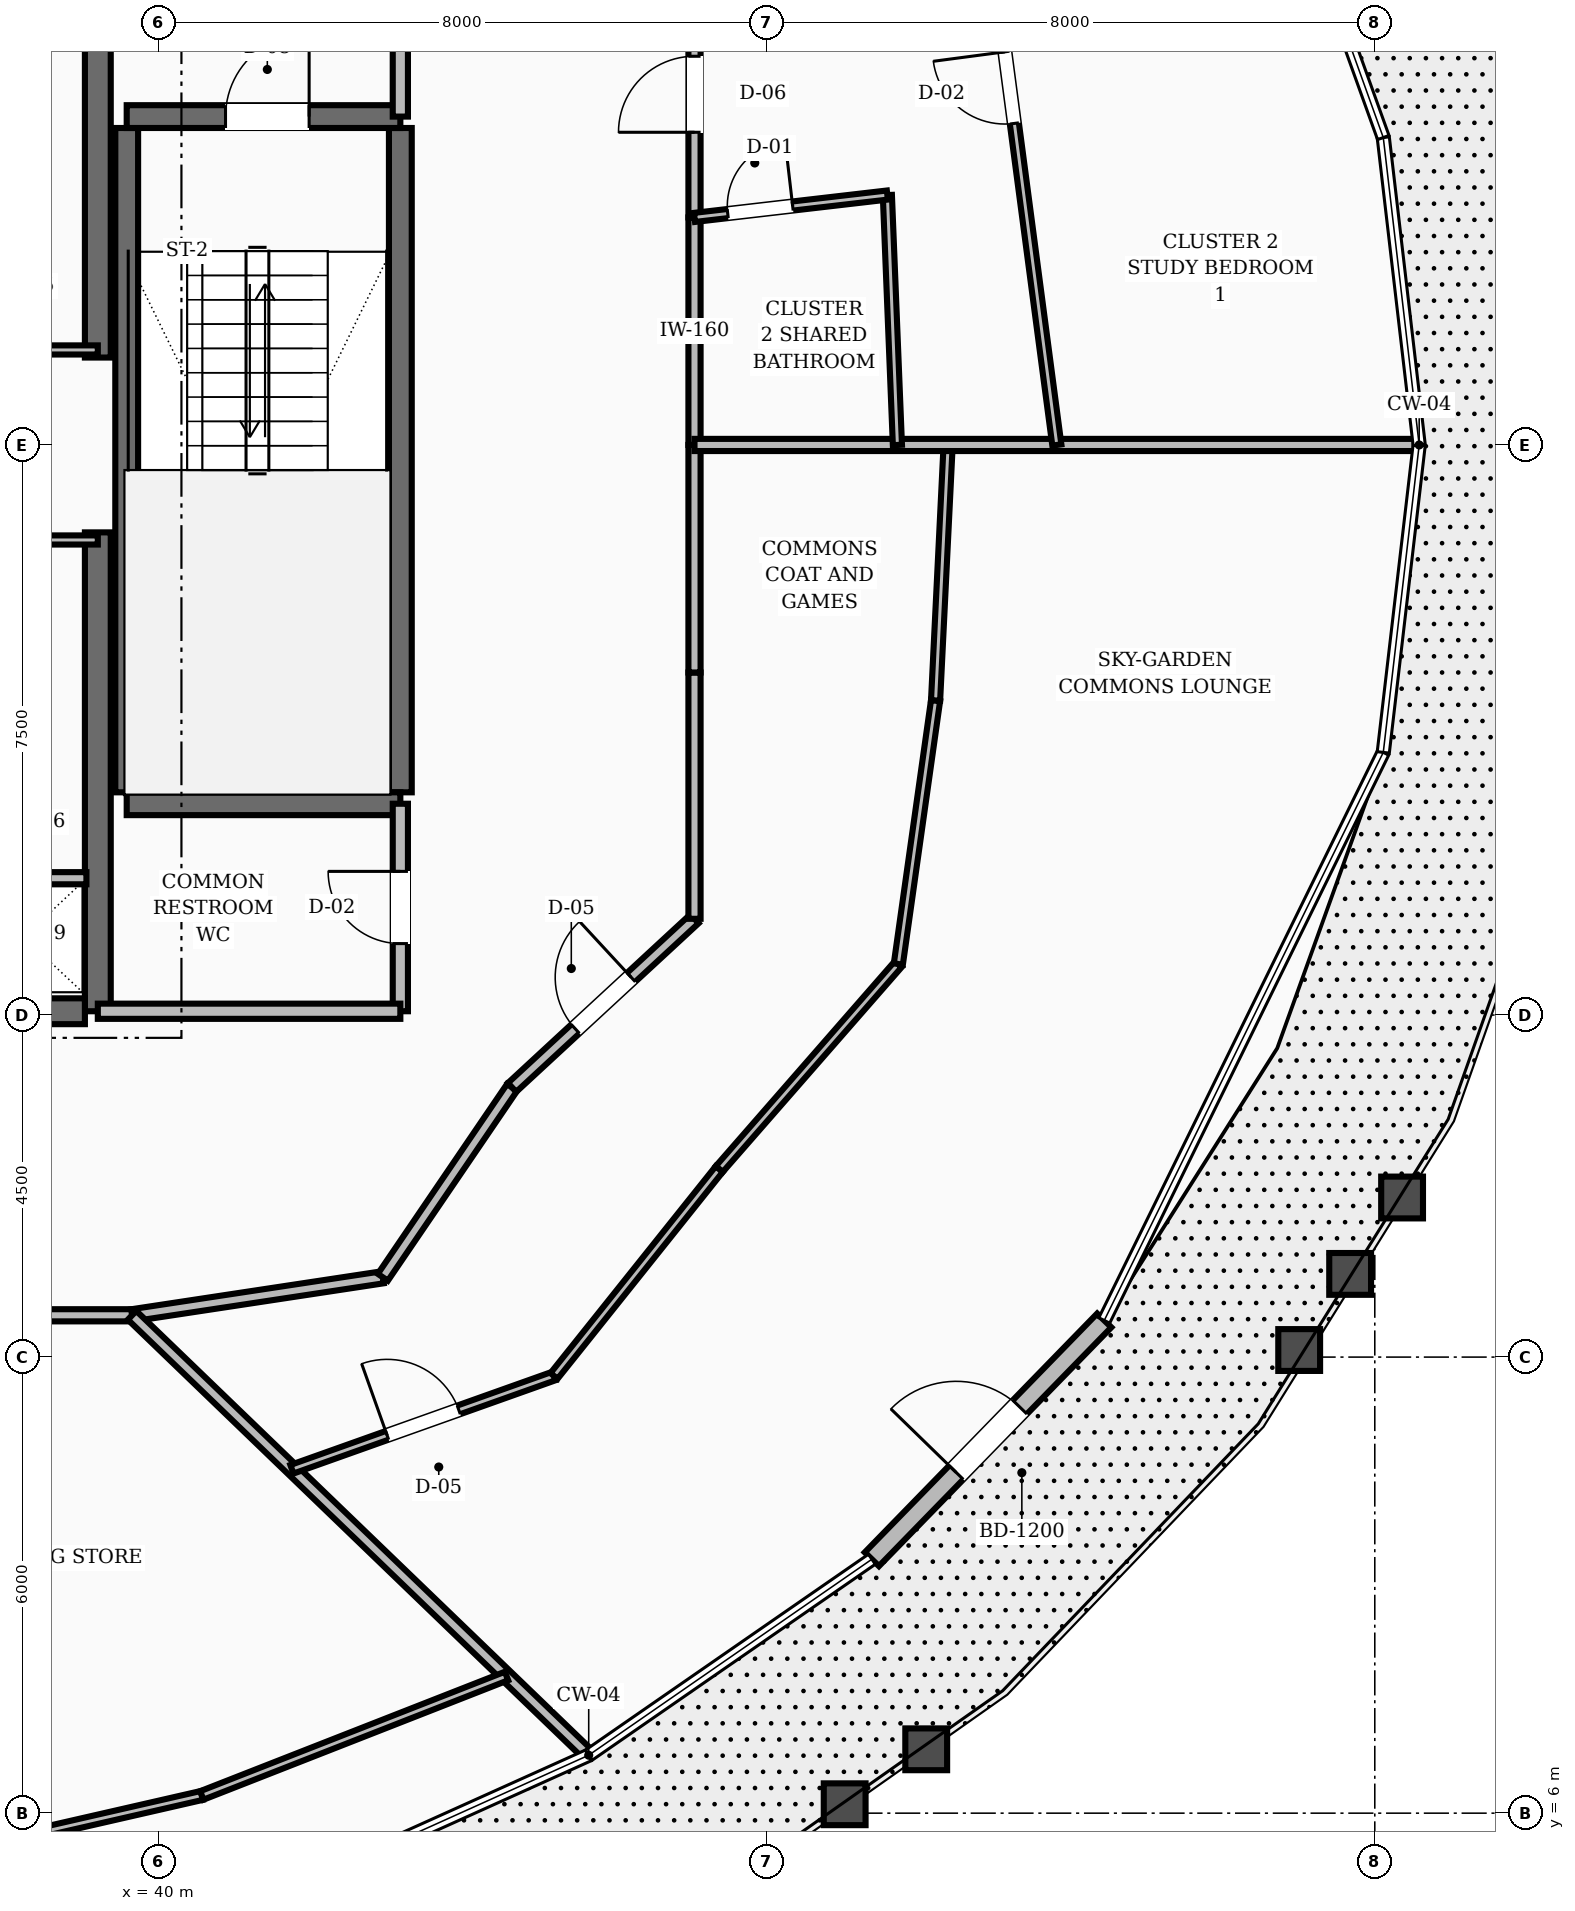
"""IFC4 building model, lengths in metres.
Left out: names, types, materials, properties, quantities, classifications, styles, units other than length and angle.
Written with IfcOpenShell. Run it as: python <this file> out.ifc"""

import sys

from ifc_helpers import new_model, si_unit, direction, frame, frame_2d, origin, place, context, subcontext, project, spatial, rectangle, extrude, element, fill, save


model = new_model("IFC4")
c1 = context("Model", 3, precision=1e-05, world=origin(), true_north=direction((0.0, 1.0)))
c2 = subcontext(c1, "Body", "Model", "MODEL_VIEW")
j1 = project(units=[si_unit("LENGTHUNIT", "METRE"), si_unit("PLANEANGLEUNIT", "RADIAN")], contexts=[c1])
p1 = place(None, origin())
s1 = spatial("IfcSite", under=j1, at=p1, CompositionType="ELEMENT")
p2 = place(p1, origin())
s2 = spatial("IfcBuilding", under=s1, at=p2, CompositionType="ELEMENT")
p3 = place(p2, frame((0.0, 0.0, 189.2)))
s3 = spatial("IfcBuildingStorey", under=s2, at=p3, CompositionType="ELEMENT", Elevation=189.2)
for number, where, z_axis, x_axis in (
    (1, (39.2, 16.55, 0.0), (0.0, 0.0, 1.0), (0.0, 1.0, 0.0)),
    (2, (39.2, 25.15, 0.0), (0.0, 0.0, 1.0), (0.0, 1.0, 0.0)),
):
    element("IfcWall", number, at=place(p3, frame(where, z_axis=z_axis, x_axis=x_axis)), inside=s3, PredefinedType="SHEAR", context=c2, shape_type="SweptSolid", body=[
        extrude(rectangle(XDim=6.3, YDim=0.34, at=frame_2d((3.15, 0.0))), origin(), (0.0, 0.0, 1.0), 3.6),
    ])
p4 = place(p3, frame((35.8, 16.55, 0.0), z_axis=(0.0, 0.0, 1.0), x_axis=(1.0, 0.0, 0.0)))
e3 = element("IfcWall", 3, at=p4, inside=s3, PredefinedType="SHEAR", context=c2, shape_type="SweptSolid", body=[
    extrude(rectangle(XDim=3.23, YDim=0.34, at=frame_2d((1.615, 0.0))), origin(), (0.0, 0.0, 1.0), 3.6),
])
p5 = place(p4, frame((0.3, 0.0, 0.0)))
e4 = element("IfcOpeningElement", 4, at=p5, cuts=e3, PredefinedType="OPENING", context=c2, shape_type="SweptSolid", body=[
    extrude(rectangle(XDim=1.1, YDim=2.1, at=frame_2d((0.55, 1.05))), frame((0.0, 0.18, 0.0), z_axis=(0.0, -1.0, 0.0), x_axis=(1.0, 0.0, 0.0)), (0.0, 0.0, 1.0), 0.36),
])
for number, where, z_axis, x_axis in (
    (5, (43.18, 19.43, 0.0), (0.0, 0.0, 1.0), (0.0, 1.0, 0.0)),
    (6, (39.58, 19.43, 0.0), (0.0, 0.0, 1.0), (0.0, 1.0, 0.0)),
):
    element("IfcWall", number, at=place(p3, frame(where, z_axis=z_axis, x_axis=x_axis)), inside=s3, PredefinedType="SHEAR", context=c2, shape_type="SweptSolid", body=[
        extrude(rectangle(XDim=8.74, YDim=0.3, at=frame_2d((4.37, 0.0))), origin(), (0.0, 0.0, 1.0), 3.6),
    ])
p6 = place(p3, frame((39.58, 19.28, 0.0), z_axis=(0.0, 0.0, 1.0), x_axis=(1.0, 0.0, 0.0)))
e7 = element("IfcWall", 7, at=p6, inside=s3, PredefinedType="SHEAR", context=c2, shape_type="SweptSolid", body=[
    extrude(rectangle(XDim=3.6, YDim=0.3, at=frame_2d((1.8, 0.0))), origin(), (0.0, 0.0, 1.0), 3.6),
])
p7 = place(p3, frame((39.58, 28.32, 0.0), z_axis=(0.0, 0.0, 1.0), x_axis=(1.0, 0.0, 0.0)))
e8 = element("IfcWall", 8, at=p7, inside=s3, PredefinedType="SHEAR", context=c2, shape_type="SweptSolid", body=[
    extrude(rectangle(XDim=3.6, YDim=0.3, at=frame_2d((1.8, 0.0))), origin(), (0.0, 0.0, 1.0), 3.6),
])
p8 = place(p7, frame((1.3, 0.0, 0.0)))
e9 = element("IfcOpeningElement", 9, at=p8, cuts=e8, PredefinedType="OPENING", context=c2, shape_type="SweptSolid", body=[
    extrude(rectangle(XDim=1.1, YDim=2.1, at=frame_2d((0.55, 1.05))), frame((0.0, 0.16, 0.0), z_axis=(0.0, -1.0, 0.0), x_axis=(1.0, 0.0, 0.0)), (0.0, 0.0, 1.0), 0.32),
])
p9 = place(p3, frame((49.384, 9.341, 0.0), z_axis=(0.0, 0.0, 1.0), x_axis=(0.697434596523, 0.716648437919, 0.0)))
e10 = element("IfcWall", 10, at=p9, inside=s3, PredefinedType="STANDARD", context=c2, shape_type="SweptSolid", body=[
    extrude(rectangle(XDim=4.384, YDim=0.26, at=frame_2d((2.192, 0.0))), origin(), (0.0, 0.0, 1.0), 2.82),
])
p10 = place(p9, frame((1.592, 0.0, 0.0)))
e11 = element("IfcOpeningElement", 11, at=p10, cuts=e10, PredefinedType="OPENING", context=c2, shape_type="SweptSolid", body=[
    extrude(rectangle(XDim=1.2, YDim=2.15, at=frame_2d((0.6, 1.075))), frame((0.0, 0.14, 0.0), z_axis=(0.0, -1.0, 0.0), x_axis=(1.0, 0.0, 0.0)), (0.0, 0.0, 1.0), 0.28),
])
p11 = place(p3, frame((43.18, 28.32, 0.0), z_axis=(0.0, 0.0, 1.0), x_axis=(0.0, 1.0, 0.0)))
e12 = element("IfcWall", 12, at=p11, inside=s3, PredefinedType="SOLIDWALL", context=c2, shape_type="SweptSolid", body=[
    extrude(rectangle(XDim=3.13, YDim=0.2, at=frame_2d((1.565, 0.0))), origin(), (0.0, 0.0, 1.0), 2.8),
])
p12 = place(p11, frame((1.015, 0.0, 0.0)))
e13 = element("IfcOpeningElement", 13, at=p12, cuts=e12, PredefinedType="OPENING", context=c2, shape_type="SweptSolid", body=[
    extrude(rectangle(XDim=1.1, YDim=2.1, at=frame_2d((0.55, 1.05))), frame((0.0, 0.11, 0.0), z_axis=(0.0, -1.0, 0.0), x_axis=(1.0, 0.0, 0.0)), (0.0, 0.0, 1.0), 0.22),
])
p13 = place(p3, frame((43.18, 16.55, 0.0), z_axis=(0.0, 0.0, 1.0), x_axis=(0.0, 1.0, 0.0)))
e14 = element("IfcWall", 14, at=p13, inside=s3, PredefinedType="SOLIDWALL", context=c2, shape_type="SweptSolid", body=[
    extrude(rectangle(XDim=2.73, YDim=0.2, at=frame_2d((1.365, 0.0))), origin(), (0.0, 0.0, 1.0), 2.8),
])
p14 = place(p13, frame((0.89, 0.0, 0.0)))
e15 = element("IfcOpeningElement", 15, at=p14, cuts=e14, PredefinedType="OPENING", context=c2, shape_type="SweptSolid", body=[
    extrude(rectangle(XDim=0.95, YDim=2.1, at=frame_2d((0.475, 1.05))), frame((0.0, 0.11, 0.0), z_axis=(0.0, -1.0, 0.0), x_axis=(1.0, 0.0, 0.0)), (0.0, 0.0, 1.0), 0.22),
])
p15 = place(p3, frame((39.2, 16.55, 0.0), z_axis=(0.0, 0.0, 1.0), x_axis=(1.0, 0.0, 0.0)))
e16 = element("IfcWall", 16, at=p15, inside=s3, PredefinedType="SOLIDWALL", context=c2, shape_type="SweptSolid", body=[
    extrude(rectangle(XDim=3.98, YDim=0.2, at=frame_2d((1.99, 0.0))), origin(), (0.0, 0.0, 1.0), 2.8),
])
p16 = place(p3, frame((37.4, 18.3, 0.0), z_axis=(0.0, 0.0, 1.0), x_axis=(1.0, 0.0, 0.0)))
e17 = element("IfcWall", 17, at=p16, inside=s3, PredefinedType="SOLIDWALL", context=c2, shape_type="SweptSolid", body=[
    extrude(rectangle(XDim=1.65, YDim=0.16, at=frame_2d((0.825, 0.0))), origin(), (0.0, 0.0, 1.0), 2.8),
])
for number, where, z_axis, x_axis in (
    (18, (37.4, 25.25, 0.0), (0.0, 0.0, 1.0), (1.0, 0.0, 0.0)),
    (19, (37.4, 22.75, 0.0), (0.0, 0.0, 1.0), (1.0, 0.0, 0.0)),
):
    element("IfcWall", number, at=place(p3, frame(where, z_axis=z_axis, x_axis=x_axis)), inside=s3, PredefinedType="PARTITIONING", context=c2, shape_type="SweptSolid", body=[
        extrude(rectangle(XDim=1.8, YDim=0.12, at=frame_2d((0.9, 0.0))), origin(), (0.0, 0.0, 1.0), 2.8),
    ])
p17 = place(p3, frame((47.05, 24.0, 0.0), z_axis=(0.0, 0.0, 1.0), x_axis=(0.0, 1.0, 0.0)))
e20 = element("IfcWall", 20, at=p17, inside=s3, PredefinedType="SOLIDWALL", context=c2, shape_type="SweptSolid", body=[
    extrude(rectangle(XDim=2.994, YDim=0.16, at=frame_2d((1.497, 0.0))), origin(), (0.0, 0.0, 1.0), 2.8),
])
p18 = place(p3, frame((47.05, 26.994, 0.0), z_axis=(0.0, 0.0, 1.0), x_axis=(0.0, 1.0, 0.0)))
e21 = element("IfcWall", 21, at=p18, inside=s3, PredefinedType="SOLIDWALL", context=c2, shape_type="SweptSolid", body=[
    extrude(rectangle(XDim=3.24, YDim=0.16, at=frame_2d((1.62, 0.0))), origin(), (0.0, 0.0, 1.0), 2.8),
])
p19 = place(p18, frame((1.12, 0.0, 0.0)))
e22 = element("IfcOpeningElement", 22, at=p19, cuts=e21, PredefinedType="OPENING", context=c2, shape_type="SweptSolid", body=[
    extrude(rectangle(XDim=1.0, YDim=2.1, at=frame_2d((0.5, 1.05))), frame((0.0, 0.09, 0.0), z_axis=(0.0, -1.0, 0.0), x_axis=(1.0, 0.0, 0.0)), (0.0, 0.0, 1.0), 0.18),
])
p20 = place(p3, frame((36.743, 12.55, 0.0), z_axis=(0.0, 0.0, 1.0), x_axis=(1.0, 0.0, 0.0)))
e23 = element("IfcWall", 23, at=p20, inside=s3, PredefinedType="SOLIDWALL", context=c2, shape_type="SweptSolid", body=[
    extrude(rectangle(XDim=2.908, YDim=0.16, at=frame_2d((1.454, 0.0))), origin(), (0.0, 0.0, 1.0), 2.8),
])
p21 = place(p3, frame((39.651, 12.55, 0.0), z_axis=(0.0, 0.0, 1.0), x_axis=(0.988710906508, 0.149835721217, 0.0)))
e24 = element("IfcWall", 24, at=p21, inside=s3, PredefinedType="SOLIDWALL", context=c2, shape_type="SweptSolid", body=[
    extrude(rectangle(XDim=3.337, YDim=0.16, at=frame_2d((1.668, 0.0))), origin(), (0.0, 0.0, 1.0), 2.8),
])
p22 = place(p3, frame((42.95, 13.05, 0.0), z_axis=(0.0, 0.0, 1.0), x_axis=(0.562674669208, 0.826678423955, 0.0)))
e25 = element("IfcWall", 25, at=p22, inside=s3, PredefinedType="SOLIDWALL", context=c2, shape_type="SweptSolid", body=[
    extrude(rectangle(XDim=3.021, YDim=0.16, at=frame_2d((1.511, 0.0))), origin(), (0.0, 0.0, 1.0), 2.8),
])
p23 = place(p3, frame((44.65, 15.548, 0.0), z_axis=(0.0, 0.0, 1.0), x_axis=(0.734347936521, 0.678773237633, 0.0)))
e26 = element("IfcWall", 26, at=p23, inside=s3, PredefinedType="SOLIDWALL", context=c2, shape_type="SweptSolid", body=[
    extrude(rectangle(XDim=3.268, YDim=0.16, at=frame_2d((1.634, 0.0))), origin(), (0.0, 0.0, 1.0), 2.8),
])
p24 = place(p23, frame((1.134, 0.0, 0.0)))
e27 = element("IfcOpeningElement", 27, at=p24, cuts=e26, PredefinedType="OPENING", context=c2, shape_type="SweptSolid", body=[
    extrude(rectangle(XDim=1.0, YDim=2.1, at=frame_2d((0.5, 1.05))), frame((0.0, 0.09, 0.0), z_axis=(0.0, -1.0, 0.0), x_axis=(1.0, 0.0, 0.0)), (0.0, 0.0, 1.0), 0.18),
])
p25 = place(p3, frame((47.05, 17.766, 0.0), z_axis=(0.0, 0.0, 1.0), x_axis=(0.0, 1.0, 0.0)))
e28 = element("IfcWall", 28, at=p25, inside=s3, PredefinedType="SOLIDWALL", context=c2, shape_type="SweptSolid", body=[
    extrude(rectangle(XDim=3.24, YDim=0.16, at=frame_2d((1.62, 0.0))), origin(), (0.0, 0.0, 1.0), 2.8),
])
p26 = place(p3, frame((47.05, 21.006, 0.0), z_axis=(0.0, 0.0, 1.0), x_axis=(0.0, 1.0, 0.0)))
e29 = element("IfcWall", 29, at=p26, inside=s3, PredefinedType="SOLIDWALL", context=c2, shape_type="SweptSolid", body=[
    extrude(rectangle(XDim=2.994, YDim=0.16, at=frame_2d((1.497, 0.0))), origin(), (0.0, 0.0, 1.0), 2.8),
])
p27 = place(p3, frame((39.651, 12.55, 0.0), z_axis=(0.0, 0.0, 1.0), x_axis=(0.72017417734, -0.693793308048, 0.0)))
e30 = element("IfcWall", 30, at=p27, inside=s3, PredefinedType="SOLIDWALL", context=c2, shape_type="SweptSolid", body=[
    extrude(rectangle(XDim=8.292, YDim=0.16, at=frame_2d((4.146, 0.0))), origin(), (0.0, 0.0, 1.0), 2.8),
])
p28 = place(p3, frame((41.753, 10.524, 0.0), z_axis=(0.0, 0.0, 1.0), x_axis=(0.942114059341, 0.335292557615, 0.0)))
e31 = element("IfcWall", 31, at=p28, inside=s3, PredefinedType="PARTITIONING", context=c2, shape_type="SweptSolid", body=[
    extrude(rectangle(XDim=3.66, YDim=0.12, at=frame_2d((1.83, 0.0))), origin(), (0.0, 0.0, 1.0), 2.8),
])
p29 = place(p28, frame((1.33, 0.0, 0.0)))
e32 = element("IfcOpeningElement", 32, at=p29, cuts=e31, PredefinedType="OPENING", context=c2, shape_type="SweptSolid", body=[
    extrude(rectangle(XDim=1.0, YDim=2.1, at=frame_2d((0.5, 1.05))), frame((0.0, 0.07, 0.0), z_axis=(0.0, -1.0, 0.0), x_axis=(1.0, 0.0, 0.0)), (0.0, 0.0, 1.0), 0.14),
])
p30 = place(p3, frame((45.202, 11.752, 0.0), z_axis=(0.0, 0.0, 1.0), x_axis=(0.624079707302, 0.781360684277, 0.0)))
e33 = element("IfcWall", 33, at=p30, inside=s3, PredefinedType="PARTITIONING", context=c2, shape_type="SweptSolid", body=[
    extrude(rectangle(XDim=3.485, YDim=0.12, at=frame_2d((1.742, 0.0))), origin(), (0.0, 0.0, 1.0), 2.8),
])
p31 = place(p3, frame((47.377, 14.475, 0.0), z_axis=(0.0, 0.0, 1.0), x_axis=(0.657833303756, 0.753163557582, 0.0)))
e34 = element("IfcWall", 34, at=p31, inside=s3, PredefinedType="PARTITIONING", context=c2, shape_type="SweptSolid", body=[
    extrude(rectangle(XDim=3.58, YDim=0.12, at=frame_2d((1.79, 0.0))), origin(), (0.0, 0.0, 1.0), 2.8),
])
p32 = place(p3, frame((49.732, 17.171, 0.0), z_axis=(0.0, 0.0, 1.0), x_axis=(0.13984978517, 0.990172731188, 0.0)))
e35 = element("IfcWall", 35, at=p32, inside=s3, PredefinedType="PARTITIONING", context=c2, shape_type="SweptSolid", body=[
    extrude(rectangle(XDim=3.502, YDim=0.12, at=frame_2d((1.751, 0.0))), origin(), (0.0, 0.0, 1.0), 2.8),
])
p33 = place(p3, frame((50.222, 20.639, 0.0), z_axis=(0.0, 0.0, 1.0), x_axis=(0.049112654501, 0.998793245456, 0.0)))
e36 = element("IfcWall", 36, at=p33, inside=s3, PredefinedType="PARTITIONING", context=c2, shape_type="SweptSolid", body=[
    extrude(rectangle(XDim=3.365, YDim=0.12, at=frame_2d((1.683, 0.0))), origin(), (0.0, 0.0, 1.0), 2.8),
])
p34 = place(p3, frame((47.05, 24.0, 0.0), z_axis=(0.0, 0.0, 1.0), x_axis=(1.0, 0.0, 0.0)))
e37 = element("IfcWall", 37, at=p34, inside=s3, PredefinedType="SOLIDWALL", context=c2, shape_type="SweptSolid", body=[
    extrude(rectangle(XDim=9.484, YDim=0.16, at=frame_2d((4.742, 0.0))), origin(), (0.0, 0.0, 1.0), 2.8),
])
p35 = place(p3, frame((49.719, 24.0, 0.0), z_axis=(0.0, 0.0, 1.0), x_axis=(-0.040139896907, 0.999194069576, 0.0)))
e38 = element("IfcWall", 38, at=p35, inside=s3, PredefinedType="PARTITIONING", context=c2, shape_type="SweptSolid", body=[
    extrude(rectangle(XDim=3.291, YDim=0.12, at=frame_2d((1.645, 0.0))), origin(), (0.0, 0.0, 1.0), 2.8),
])
p36 = place(p3, frame((47.05, 26.994, 0.0), z_axis=(0.0, 0.0, 1.0), x_axis=(0.99334557756, 0.115171886939, 0.0)))
e39 = element("IfcWall", 39, at=p36, inside=s3, PredefinedType="PARTITIONING", context=c2, shape_type="SweptSolid", body=[
    extrude(rectangle(XDim=2.554, YDim=0.12, at=frame_2d((1.277, 0.0))), origin(), (0.0, 0.0, 1.0), 2.8),
])
p37 = place(p36, frame((0.44, 0.0, 0.0)))
e40 = element("IfcOpeningElement", 40, at=p37, cuts=e39, PredefinedType="OPENING", context=c2, shape_type="SweptSolid", body=[
    extrude(rectangle(XDim=0.86, YDim=2.1, at=frame_2d((0.43, 1.05))), frame((0.0, 0.07, 0.0), z_axis=(0.0, -1.0, 0.0), x_axis=(1.0, 0.0, 0.0)), (0.0, 0.0, 1.0), 0.14),
])
p38 = place(p3, frame((51.817, 24.0, 0.0), z_axis=(0.0, 0.0, 1.0), x_axis=(-0.130932666577, 0.991391263237, 0.0)))
e41 = element("IfcWall", 41, at=p38, inside=s3, PredefinedType="PARTITIONING", context=c2, shape_type="SweptSolid", body=[
    extrude(rectangle(XDim=7.145, YDim=0.12, at=frame_2d((3.573, 0.0))), origin(), (0.0, 0.0, 1.0), 2.8),
])
p39 = place(p38, frame((4.267, 0.0, 0.0)))
e42 = element("IfcOpeningElement", 42, at=p39, cuts=e41, PredefinedType="OPENING", context=c2, shape_type="SweptSolid", body=[
    extrude(rectangle(XDim=0.95, YDim=2.1, at=frame_2d((0.475, 1.05))), frame((0.0, 0.07, 0.0), z_axis=(0.0, -1.0, 0.0), x_axis=(1.0, 0.0, 0.0)), (0.0, 0.0, 1.0), 0.14),
])
p40 = place(p3, frame((36.343, 5.266, 0.0), z_axis=(0.0, 0.0, 1.0), x_axis=(0.974783645489, 0.223152065836, 0.0)))
e43 = element("IfcWall", 43, at=p40, inside=s3, PredefinedType="PARTITIONING", context=c2, shape_type="SweptSolid", body=[
    extrude(rectangle(XDim=4.335, YDim=0.12, at=frame_2d((2.167, 0.0))), origin(), (0.0, 0.0, 1.0), 2.8),
])
p41 = place(p3, frame((40.568, 6.233, 0.0), z_axis=(0.0, 0.0, 1.0), x_axis=(0.931054421881, 0.36488034134, 0.0)))
e44 = element("IfcWall", 44, at=p41, inside=s3, PredefinedType="PARTITIONING", context=c2, shape_type="SweptSolid", body=[
    extrude(rectangle(XDim=4.306, YDim=0.12, at=frame_2d((2.153, 0.0))), origin(), (0.0, 0.0, 1.0), 2.8),
])
p42 = place(p10, origin())
e45 = element("IfcDoor", 45, at=p42, inside=s3, OperationType="SINGLE_SWING_LEFT", PredefinedType="DOOR", context=c2, shape_type="SweptSolid", body=[
    extrude(rectangle(XDim=1.2, YDim=2.15, at=frame_2d((0.6, 1.075))), frame((0.0, 0.025, 0.0), z_axis=(0.0, -1.0, 0.0), x_axis=(1.0, 0.0, 0.0)), (0.0, 0.0, 1.0), 0.05),
])
fill(e11, e45)
p43 = place(p8, origin())
e46 = element("IfcDoor", 46, at=p43, inside=s3, OperationType="SINGLE_SWING_RIGHT", PredefinedType="DOOR", context=c2, shape_type="SweptSolid", body=[
    extrude(rectangle(XDim=1.1, YDim=2.1, at=frame_2d((0.55, 1.05))), frame((0.0, 0.025, 0.0), z_axis=(0.0, -1.0, 0.0), x_axis=(1.0, 0.0, 0.0)), (0.0, 0.0, 1.0), 0.05),
])
fill(e9, e46)
p44 = place(p14, origin())
e47 = element("IfcDoor", 47, at=p44, inside=s3, OperationType="SINGLE_SWING_RIGHT", PredefinedType="DOOR", context=c2, shape_type="SweptSolid", body=[
    extrude(rectangle(XDim=0.95, YDim=2.1, at=frame_2d((0.475, 1.05))), frame((0.0, 0.025, 0.0), z_axis=(0.0, -1.0, 0.0), x_axis=(1.0, 0.0, 0.0)), (0.0, 0.0, 1.0), 0.05),
])
fill(e15, e47)
p45 = place(p24, origin())
e48 = element("IfcDoor", 48, at=p45, inside=s3, OperationType="SINGLE_SWING_RIGHT", PredefinedType="DOOR", context=c2, shape_type="SweptSolid", body=[
    extrude(rectangle(XDim=1.0, YDim=2.1, at=frame_2d((0.5, 1.05))), frame((0.0, 0.025, 0.0), z_axis=(0.0, -1.0, 0.0), x_axis=(1.0, 0.0, 0.0)), (0.0, 0.0, 1.0), 0.05),
])
fill(e27, e48)
p46 = place(p29, origin())
e49 = element("IfcDoor", 49, at=p46, inside=s3, OperationType="SINGLE_SWING_LEFT", PredefinedType="DOOR", context=c2, shape_type="SweptSolid", body=[
    extrude(rectangle(XDim=1.0, YDim=2.1, at=frame_2d((0.5, 1.05))), frame((0.0, 0.025, 0.0), z_axis=(0.0, -1.0, 0.0), x_axis=(1.0, 0.0, 0.0)), (0.0, 0.0, 1.0), 0.05),
])
fill(e32, e49)
p47 = place(p37, origin())
e50 = element("IfcDoor", 50, at=p47, inside=s3, OperationType="SINGLE_SWING_RIGHT", PredefinedType="DOOR", context=c2, shape_type="SweptSolid", body=[
    extrude(rectangle(XDim=0.86, YDim=2.1, at=frame_2d((0.43, 1.05))), frame((0.0, 0.025, 0.0), z_axis=(0.0, -1.0, 0.0), x_axis=(1.0, 0.0, 0.0)), (0.0, 0.0, 1.0), 0.05),
])
fill(e40, e50)
p48 = place(p19, origin())
e51 = element("IfcDoor", 51, at=p48, inside=s3, OperationType="SINGLE_SWING_LEFT", PredefinedType="DOOR", context=c2, shape_type="SweptSolid", body=[
    extrude(rectangle(XDim=1.0, YDim=2.1, at=frame_2d((0.5, 1.05))), frame((0.0, 0.025, 0.0), z_axis=(0.0, -1.0, 0.0), x_axis=(1.0, 0.0, 0.0)), (0.0, 0.0, 1.0), 0.05),
])
fill(e22, e51)
p49 = place(p39, origin())
e52 = element("IfcDoor", 52, at=p49, inside=s3, OperationType="SINGLE_SWING_RIGHT", PredefinedType="DOOR", context=c2, shape_type="SweptSolid", body=[
    extrude(rectangle(XDim=0.95, YDim=2.1, at=frame_2d((0.475, 1.05))), frame((0.0, 0.025, 0.0), z_axis=(0.0, -1.0, 0.0), x_axis=(1.0, 0.0, 0.0)), (0.0, 0.0, 1.0), 0.05),
])
fill(e42, e52)
save(model, sys.argv[1])
